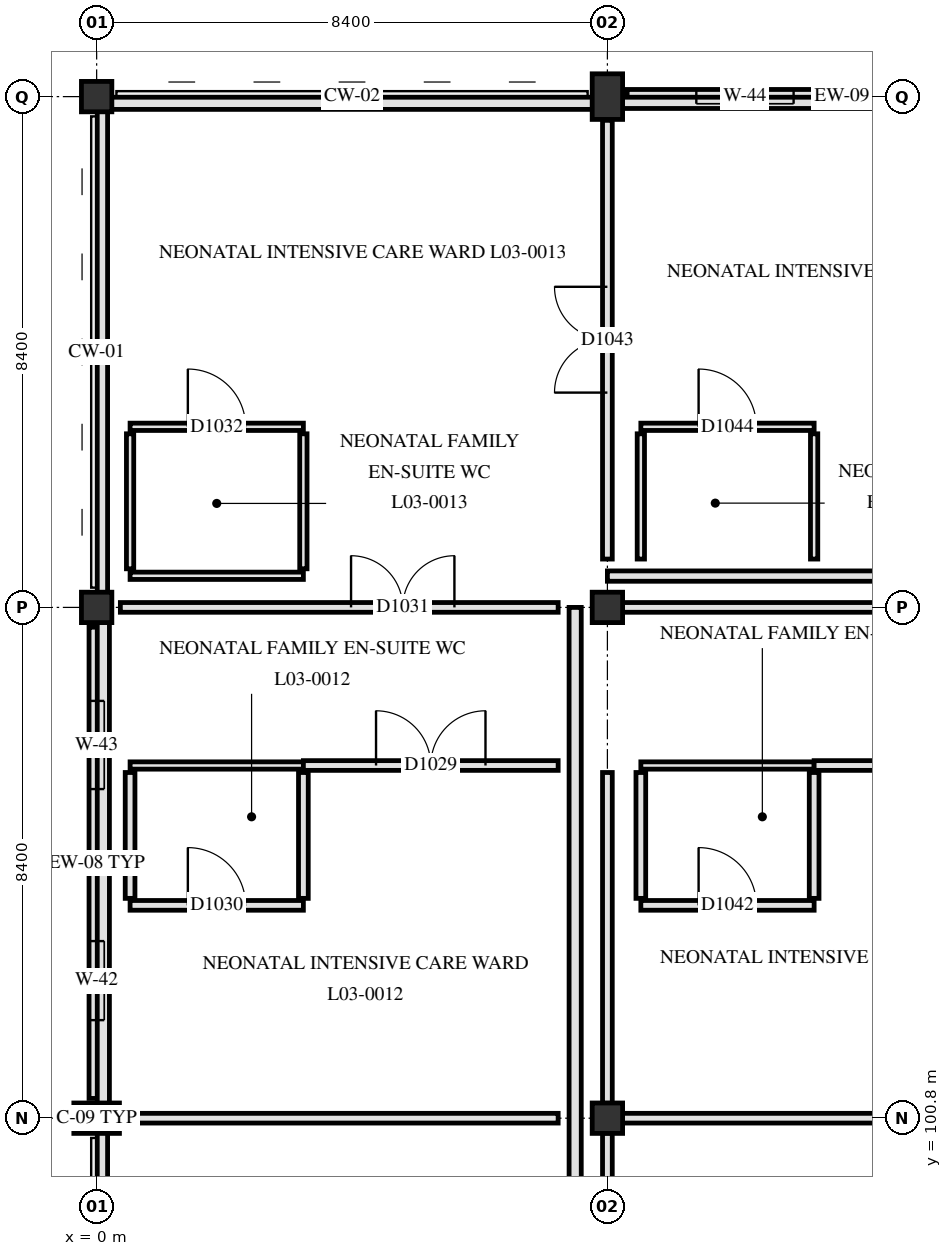
"""IFC4 building model, lengths in metres.
Left out: names, types, materials, properties, quantities, classifications, styles, units other than length and angle.
Written with IfcOpenShell. Run it as: python <this file> out.ifc"""

import sys

from ifc_helpers import new_model, si_unit, direction, frame, frame_2d, origin, origin_2d, place, context, subcontext, project, spatial, rectangle, extrude, element, fill, save


model = new_model("IFC4")
c1 = context("Model", 3, precision=1e-05, world=origin(), true_north=direction((0.0, 1.0)))
c2 = subcontext(c1, "Body", "Model", "MODEL_VIEW")
j1 = project(units=[si_unit("LENGTHUNIT", "METRE"), si_unit("PLANEANGLEUNIT", "RADIAN")], contexts=[c1])
p1 = place(None, origin())
s1 = spatial("IfcSite", under=j1, at=p1, CompositionType="ELEMENT")
p2 = place(p1, origin())
s2 = spatial("IfcBuilding", under=s1, at=p2, CompositionType="ELEMENT")
p3 = place(p2, frame((0.0, 0.0, 14.4)))
s3 = spatial("IfcBuildingStorey", under=s2, at=p3, CompositionType="ELEMENT", Elevation=14.4)
p4 = place(p3, frame((0.0, 100.8, 0.0), z_axis=(0.0, 0.0, 1.0), x_axis=(0.0, 1.0, 0.0)))
e1 = element("IfcColumn", 1, at=p4, inside=s3, PredefinedType="PILASTER", context=c2, shape_type="SweptSolid", body=[
    extrude(rectangle(XDim=0.5, YDim=0.75, at=origin_2d()), origin(), (0.0, 0.0, 1.0), 4.2),
])
for number, where, z_axis, x_axis in (
    (2, (0.0, 109.2, 0.0), (0.0, 0.0, 1.0), (1.0, 0.0, 0.0)),
    (3, (0.0, 117.6, 0.0), (0.0, 0.0, 1.0), (1.0, 0.0, 0.0)),
    (4, (8.4, 100.8, 0.0), (0.0, 0.0, 1.0), (1.0, 0.0, 0.0)),
    (5, (8.4, 109.2, 0.0), (0.0, 0.0, 1.0), (1.0, 0.0, 0.0)),
):
    element("IfcColumn", number, at=place(p3, frame(where, z_axis=z_axis, x_axis=x_axis)), inside=s3, PredefinedType="COLUMN", context=c2, shape_type="SweptSolid", body=[
        extrude(rectangle(XDim=0.5, YDim=0.5, at=origin_2d()), origin(), (0.0, 0.0, 1.0), 4.2),
    ])
p5 = place(p3, frame((8.4, 117.6, 0.0), z_axis=(0.0, 0.0, 1.0), x_axis=(1.0, 0.0, 0.0)))
e6 = element("IfcColumn", 6, at=p5, inside=s3, PredefinedType="PILASTER", context=c2, shape_type="SweptSolid", body=[
    extrude(rectangle(XDim=0.5, YDim=0.75, at=origin_2d()), origin(), (0.0, 0.0, 1.0), 4.2),
])
p6 = place(p3, frame((0.0, 101.125, 0.0), z_axis=(0.0, 0.0, 1.0), x_axis=(0.0, 1.0, 0.0)))
e7 = element("IfcWall", 7, at=p6, inside=s3, PredefinedType="SOLIDWALL", context=c2, shape_type="SweptSolid", body=[
    extrude(rectangle(XDim=7.75, YDim=0.25, at=frame_2d((3.875, 0.0))), origin(), (0.0, 0.0, 1.0), 3.19),
])
p7 = place(p6, frame((1.288, 0.0, 0.85)))
e8 = element("IfcOpeningElement", 8, at=p7, cuts=e7, PredefinedType="OPENING", context=c2, shape_type="SweptSolid", body=[
    extrude(rectangle(XDim=1.3, YDim=1.78, at=frame_2d((0.65, 0.89))), frame((0.0, 0.135, 0.0), z_axis=(0.0, -1.0, 0.0), x_axis=(1.0, 0.0, 0.0)), (0.0, 0.0, 1.0), 0.27),
])
p8 = place(p6, frame((5.087, 0.0, 0.85)))
e9 = element("IfcOpeningElement", 9, at=p8, cuts=e7, PredefinedType="OPENING", context=c2, shape_type="SweptSolid", body=[
    extrude(rectangle(XDim=1.45, YDim=1.78, at=frame_2d((0.725, 0.89))), frame((0.0, 0.135, 0.0), z_axis=(0.0, -1.0, 0.0), x_axis=(1.0, 0.0, 0.0)), (0.0, 0.0, 1.0), 0.27),
])
p9 = place(p3, frame((8.725, 117.6, 0.0), z_axis=(0.0, 0.0, 1.0), x_axis=(1.0, 0.0, 0.0)))
e10 = element("IfcWall", 10, at=p9, inside=s3, PredefinedType="SOLIDWALL", context=c2, shape_type="SweptSolid", body=[
    extrude(rectangle(XDim=7.75, YDim=0.235, at=frame_2d((3.875, 0.0))), origin(), (0.0, 0.0, 1.0), 3.19),
])
p10 = place(p9, frame((1.137, 0.0, 0.85)))
e11 = element("IfcOpeningElement", 11, at=p10, cuts=e10, PredefinedType="OPENING", context=c2, shape_type="SweptSolid", body=[
    extrude(rectangle(XDim=1.6, YDim=1.78, at=frame_2d((0.8, 0.89))), frame((0.0, 0.127, 0.0), z_axis=(0.0, -1.0, 0.0), x_axis=(1.0, 0.0, 0.0)), (0.0, 0.0, 1.0), 0.255),
])
p11 = place(p9, frame((4.938, 0.0, 0.85)))
e12 = element("IfcOpeningElement", 12, at=p11, cuts=e10, PredefinedType="OPENING", context=c2, shape_type="SweptSolid", body=[
    extrude(rectangle(XDim=1.75, YDim=1.78, at=frame_2d((0.875, 0.89))), frame((0.0, 0.127, 0.0), z_axis=(0.0, -1.0, 0.0), x_axis=(1.0, 0.0, 0.0)), (0.0, 0.0, 1.0), 0.255),
])
p12 = place(p3, frame((0.095, 109.2, 4.18), z_axis=(0.0, 0.0, 1.0), x_axis=(0.0, 1.0, 0.0)))
e13 = element("IfcWall", 13, at=p12, inside=s3, PredefinedType="PARAPET", context=c2, shape_type="SweptSolid", body=[
    extrude(rectangle(XDim=8.4, YDim=0.17, at=frame_2d((4.2, 0.0))), origin(), (0.0, 0.0, 1.0), 1.17),
])
p13 = place(p3, frame((0.0, 117.49, 4.18), z_axis=(0.0, 0.0, 1.0), x_axis=(1.0, 0.0, 0.0)))
e14 = element("IfcWall", 14, at=p13, inside=s3, PredefinedType="PARAPET", context=c2, shape_type="SweptSolid", body=[
    extrude(rectangle(XDim=8.4, YDim=0.2, at=frame_2d((4.2, 0.0))), origin(), (0.0, 0.0, 1.0), 1.17),
])
p14 = place(p3, frame((8.4, 117.498, 4.18), z_axis=(0.0, 0.0, 1.0), x_axis=(1.0, 0.0, 0.0)))
e15 = element("IfcWall", 15, at=p14, inside=s3, PredefinedType="PARAPET", context=c2, shape_type="SweptSolid", body=[
    extrude(rectangle(XDim=8.4, YDim=0.185, at=frame_2d((4.2, 0.0))), origin(), (0.0, 0.0, 1.0), 1.17),
])
p15 = place(p3, frame((41.62, 109.715, 4.18), z_axis=(0.0, 0.0, 1.0), x_axis=(-1.0, 0.0, 0.0)))
e16 = element("IfcWall", 16, at=p15, inside=s3, PredefinedType="PARAPET", context=c2, shape_type="SweptSolid", body=[
    extrude(rectangle(XDim=33.22, YDim=0.17, at=frame_2d((16.61, 0.0))), origin(), (0.0, 0.0, 1.0), 1.17),
])
p16 = place(p3, frame((7.87, 109.2, 4.18), z_axis=(0.0, 0.0, 1.0), x_axis=(0.0, -1.0, 0.0)))
e17 = element("IfcWall", 17, at=p16, inside=s3, PredefinedType="PARAPET", context=c2, shape_type="SweptSolid", body=[
    extrude(rectangle(XDim=50.4, YDim=0.2, at=frame_2d((25.2, 0.0))), origin(), (0.0, 0.0, 1.0), 1.17),
])
p17 = place(p3, frame((0.095, 92.4, 4.18), z_axis=(0.0, 0.0, 1.0), x_axis=(0.0, 1.0, 0.0)))
e18 = element("IfcWall", 18, at=p17, inside=s3, PredefinedType="PARAPET", context=c2, shape_type="SweptSolid", body=[
    extrude(rectangle(XDim=8.4, YDim=0.17, at=frame_2d((4.2, 0.0))), origin(), (0.0, 0.0, 1.0), 1.17),
])
p18 = place(p3, frame((0.11, 100.8, 4.18), z_axis=(0.0, 0.0, 1.0), x_axis=(0.0, 1.0, 0.0)))
e19 = element("IfcWall", 19, at=p18, inside=s3, PredefinedType="PARAPET", context=c2, shape_type="SweptSolid", body=[
    extrude(rectangle(XDim=8.4, YDim=0.2, at=frame_2d((4.2, 0.0))), origin(), (0.0, 0.0, 1.0), 1.17),
])
p19 = place(p3, frame((0.39, 100.8, 0.0), z_axis=(0.0, 0.0, 1.0), x_axis=(1.0, 0.0, 0.0)))
e20 = element("IfcWall", 20, at=p19, inside=s3, PredefinedType="PARTITIONING", context=c2, shape_type="SweptSolid", body=[
    extrude(rectangle(XDim=7.2, YDim=0.16, at=frame_2d((3.6, 0.0))), origin(), (0.0, 0.0, 1.0), 3.29),
])
p20 = place(p3, frame((8.645, 100.8, 0.0), z_axis=(0.0, 0.0, 1.0), x_axis=(1.0, 0.0, 0.0)))
e21 = element("IfcWall", 21, at=p20, inside=s3, PredefinedType="PARTITIONING", context=c2, shape_type="SweptSolid", body=[
    extrude(rectangle(XDim=7.91, YDim=0.16, at=frame_2d((3.955, 0.0))), origin(), (0.0, 0.0, 1.0), 3.28),
])
p21 = place(p3, frame((0.55, 104.3, 0.0), z_axis=(0.0, 0.0, 1.0), x_axis=(1.0, 0.0, 0.0)))
e22 = element("IfcWall", 22, at=p21, inside=s3, PredefinedType="PARTITIONING", context=c2, shape_type="SweptSolid", body=[
    extrude(rectangle(XDim=2.85, YDim=0.16, at=frame_2d((1.425, 0.0))), origin(), (0.0, 0.0, 1.0), 3.89),
])
p22 = place(p21, frame((0.95, 0.0, 0.0)))
e23 = element("IfcOpeningElement", 23, at=p22, cuts=e22, PredefinedType="OPENING", context=c2, shape_type="SweptSolid", body=[
    extrude(rectangle(XDim=0.95, YDim=2.1, at=frame_2d((0.475, 1.05))), frame((0.0, 0.09, 0.0), z_axis=(0.0, -1.0, 0.0), x_axis=(1.0, 0.0, 0.0)), (0.0, 0.0, 1.0), 0.18),
])
p23 = place(p3, frame((8.95, 104.3, 0.0), z_axis=(0.0, 0.0, 1.0), x_axis=(1.0, 0.0, 0.0)))
e24 = element("IfcWall", 24, at=p23, inside=s3, PredefinedType="PARTITIONING", context=c2, shape_type="SweptSolid", body=[
    extrude(rectangle(XDim=2.85, YDim=0.16, at=frame_2d((1.425, 0.0))), origin(), (0.0, 0.0, 1.0), 3.89),
])
p24 = place(p23, frame((0.95, 0.0, 0.0)))
e25 = element("IfcOpeningElement", 25, at=p24, cuts=e24, PredefinedType="OPENING", context=c2, shape_type="SweptSolid", body=[
    extrude(rectangle(XDim=0.95, YDim=2.1, at=frame_2d((0.475, 1.05))), frame((0.0, 0.09, 0.0), z_axis=(0.0, -1.0, 0.0), x_axis=(1.0, 0.0, 0.0)), (0.0, 0.0, 1.0), 0.18),
])
p25 = place(p3, frame((0.55, 106.6, 0.0), z_axis=(0.0, 0.0, 1.0), x_axis=(1.0, 0.0, 0.0)))
e26 = element("IfcWall", 26, at=p25, inside=s3, PredefinedType="PARTITIONING", context=c2, shape_type="SweptSolid", body=[
    extrude(rectangle(XDim=2.85, YDim=0.12, at=frame_2d((1.425, 0.0))), origin(), (0.0, 0.0, 1.0), 3.89),
])
p26 = place(p3, frame((3.4, 106.6, 0.0), z_axis=(0.0, 0.0, 1.0), x_axis=(1.0, 0.0, 0.0)))
e27 = element("IfcWall", 27, at=p26, inside=s3, PredefinedType="PARTITIONING", context=c2, shape_type="SweptSolid", body=[
    extrude(rectangle(XDim=4.19, YDim=0.16, at=frame_2d((2.095, 0.0))), origin(), (0.0, 0.0, 1.0), 3.89),
])
p27 = place(p26, frame((1.195, 0.0, 0.0)))
e28 = element("IfcOpeningElement", 28, at=p27, cuts=e27, PredefinedType="OPENING", context=c2, shape_type="SweptSolid", body=[
    extrude(rectangle(XDim=1.8, YDim=2.25, at=frame_2d((0.9, 1.125))), frame((0.0, 0.09, 0.0), z_axis=(0.0, -1.0, 0.0), x_axis=(1.0, 0.0, 0.0)), (0.0, 0.0, 1.0), 0.18),
])
p28 = place(p3, frame((8.95, 106.6, 0.0), z_axis=(0.0, 0.0, 1.0), x_axis=(1.0, 0.0, 0.0)))
e29 = element("IfcWall", 29, at=p28, inside=s3, PredefinedType="PARTITIONING", context=c2, shape_type="SweptSolid", body=[
    extrude(rectangle(XDim=2.85, YDim=0.12, at=frame_2d((1.425, 0.0))), origin(), (0.0, 0.0, 1.0), 3.89),
])
p29 = place(p3, frame((11.8, 106.6, 0.0), z_axis=(0.0, 0.0, 1.0), x_axis=(1.0, 0.0, 0.0)))
e30 = element("IfcWall", 30, at=p29, inside=s3, PredefinedType="PARTITIONING", context=c2, shape_type="SweptSolid", body=[
    extrude(rectangle(XDim=5.0, YDim=0.16, at=frame_2d((2.5, 0.0))), origin(), (0.0, 0.0, 1.0), 3.33),
])
p30 = place(p29, frame((1.73, 0.0, 0.0)))
e31 = element("IfcOpeningElement", 31, at=p30, cuts=e30, PredefinedType="OPENING", context=c2, shape_type="SweptSolid", body=[
    extrude(rectangle(XDim=1.54, YDim=2.24, at=frame_2d((0.77, 1.12))), frame((0.0, 0.09, 0.0), z_axis=(0.0, -1.0, 0.0), x_axis=(1.0, 0.0, 0.0)), (0.0, 0.0, 1.0), 0.18),
])
p31 = place(p3, frame((0.39, 109.2, 0.0), z_axis=(0.0, 0.0, 1.0), x_axis=(1.0, 0.0, 0.0)))
e32 = element("IfcWall", 32, at=p31, inside=s3, PredefinedType="PARTITIONING", context=c2, shape_type="SweptSolid", body=[
    extrude(rectangle(XDim=7.2, YDim=0.16, at=frame_2d((3.6, 0.0))), origin(), (0.0, 0.0, 1.0), 3.29),
])
p32 = place(p31, frame((3.794, 0.0, 0.0)))
e33 = element("IfcOpeningElement", 33, at=p32, cuts=e32, PredefinedType="OPENING", context=c2, shape_type="SweptSolid", body=[
    extrude(rectangle(XDim=1.7, YDim=2.25, at=frame_2d((0.85, 1.125))), frame((0.0, 0.09, 0.0), z_axis=(0.0, -1.0, 0.0), x_axis=(1.0, 0.0, 0.0)), (0.0, 0.0, 1.0), 0.18),
])
p33 = place(p3, frame((8.645, 109.2, 0.0), z_axis=(0.0, 0.0, 1.0), x_axis=(1.0, 0.0, 0.0)))
e34 = element("IfcWall", 34, at=p33, inside=s3, PredefinedType="PARTITIONING", context=c2, shape_type="SweptSolid", body=[
    extrude(rectangle(XDim=7.91, YDim=0.16, at=frame_2d((3.955, 0.0))), origin(), (0.0, 0.0, 1.0), 3.28),
])
p34 = place(p3, frame((0.55, 109.72, 0.0), z_axis=(0.0, 0.0, 1.0), x_axis=(1.0, 0.0, 0.0)))
e35 = element("IfcWall", 35, at=p34, inside=s3, PredefinedType="PARTITIONING", context=c2, shape_type="SweptSolid", body=[
    extrude(rectangle(XDim=2.85, YDim=0.12, at=frame_2d((1.425, 0.0))), origin(), (0.0, 0.0, 1.0), 3.89),
])
p35 = place(p3, frame((0.55, 112.17, 0.0), z_axis=(0.0, 0.0, 1.0), x_axis=(1.0, 0.0, 0.0)))
e36 = element("IfcWall", 36, at=p35, inside=s3, PredefinedType="PARTITIONING", context=c2, shape_type="SweptSolid", body=[
    extrude(rectangle(XDim=2.85, YDim=0.12, at=frame_2d((1.425, 0.0))), origin(), (0.0, 0.0, 1.0), 3.89),
])
p36 = place(p35, frame((0.95, 0.0, 0.0)))
e37 = element("IfcOpeningElement", 37, at=p36, cuts=e36, PredefinedType="OPENING", context=c2, shape_type="SweptSolid", body=[
    extrude(rectangle(XDim=0.95, YDim=2.1, at=frame_2d((0.475, 1.05))), frame((0.0, 0.07, 0.0), z_axis=(0.0, -1.0, 0.0), x_axis=(1.0, 0.0, 0.0)), (0.0, 0.0, 1.0), 0.14),
])
p37 = place(p3, frame((8.95, 112.17, 0.0), z_axis=(0.0, 0.0, 1.0), x_axis=(1.0, 0.0, 0.0)))
e38 = element("IfcWall", 38, at=p37, inside=s3, PredefinedType="PARTITIONING", context=c2, shape_type="SweptSolid", body=[
    extrude(rectangle(XDim=2.85, YDim=0.12, at=frame_2d((1.425, 0.0))), origin(), (0.0, 0.0, 1.0), 3.89),
])
p38 = place(p37, frame((0.95, 0.0, 0.0)))
e39 = element("IfcOpeningElement", 39, at=p38, cuts=e38, PredefinedType="OPENING", context=c2, shape_type="SweptSolid", body=[
    extrude(rectangle(XDim=0.95, YDim=2.1, at=frame_2d((0.475, 1.05))), frame((0.0, 0.07, 0.0), z_axis=(0.0, -1.0, 0.0), x_axis=(1.0, 0.0, 0.0)), (0.0, 0.0, 1.0), 0.14),
])
p39 = place(p3, frame((0.55, 104.415, 0.0), z_axis=(0.0, 0.0, 1.0), x_axis=(0.0, 1.0, 0.0)))
e40 = element("IfcWall", 40, at=p39, inside=s3, PredefinedType="PARTITIONING", context=c2, shape_type="SweptSolid", body=[
    extrude(rectangle(XDim=2.07, YDim=0.16, at=frame_2d((1.035, 0.0))), origin(), (0.0, 0.0, 1.0), 3.89),
])
p40 = place(p3, frame((0.55, 109.835, 0.0), z_axis=(0.0, 0.0, 1.0), x_axis=(0.0, 1.0, 0.0)))
e41 = element("IfcWall", 41, at=p40, inside=s3, PredefinedType="PARTITIONING", context=c2, shape_type="SweptSolid", body=[
    extrude(rectangle(XDim=2.22, YDim=0.12, at=frame_2d((1.11, 0.0))), origin(), (0.0, 0.0, 1.0), 3.89),
])
p41 = place(p3, frame((3.4, 104.415, 0.0), z_axis=(0.0, 0.0, 1.0), x_axis=(0.0, 1.0, 0.0)))
e42 = element("IfcWall", 42, at=p41, inside=s3, PredefinedType="PARTITIONING", context=c2, shape_type="SweptSolid", body=[
    extrude(rectangle(XDim=2.07, YDim=0.16, at=frame_2d((1.035, 0.0))), origin(), (0.0, 0.0, 1.0), 3.89),
])
p42 = place(p3, frame((3.4, 109.835, 0.0), z_axis=(0.0, 0.0, 1.0), x_axis=(0.0, 1.0, 0.0)))
e43 = element("IfcWall", 43, at=p42, inside=s3, PredefinedType="PARTITIONING", context=c2, shape_type="SweptSolid", body=[
    extrude(rectangle(XDim=2.22, YDim=0.12, at=frame_2d((1.11, 0.0))), origin(), (0.0, 0.0, 1.0), 3.89),
])
p43 = place(p3, frame((8.4, 95.115, 0.0), z_axis=(0.0, 0.0, 1.0), x_axis=(0.0, 1.0, 0.0)))
e44 = element("IfcWall", 44, at=p43, inside=s3, PredefinedType="PARTITIONING", context=c2, shape_type="SweptSolid", body=[
    extrude(rectangle(XDim=5.44, YDim=0.16, at=frame_2d((2.72, 0.0))), origin(), (0.0, 0.0, 1.0), 3.33),
])
p44 = place(p3, frame((8.4, 101.045, 0.0), z_axis=(0.0, 0.0, 1.0), x_axis=(0.0, 1.0, 0.0)))
e45 = element("IfcWall", 45, at=p44, inside=s3, PredefinedType="PARTITIONING", context=c2, shape_type="SweptSolid", body=[
    extrude(rectangle(XDim=5.44, YDim=0.16, at=frame_2d((2.72, 0.0))), origin(), (0.0, 0.0, 1.0), 3.33),
])
p45 = place(p3, frame((8.4, 109.995, 0.0), z_axis=(0.0, 0.0, 1.0), x_axis=(0.0, 1.0, 0.0)))
e46 = element("IfcWall", 46, at=p45, inside=s3, PredefinedType="PARTITIONING", context=c2, shape_type="SweptSolid", body=[
    extrude(rectangle(XDim=7.215, YDim=0.16, at=frame_2d((3.607, 0.0))), origin(), (0.0, 0.0, 1.0), 3.34),
])
p46 = place(p45, frame((2.738, 0.0, 0.0)))
e47 = element("IfcOpeningElement", 47, at=p46, cuts=e46, PredefinedType="OPENING", context=c2, shape_type="SweptSolid", body=[
    extrude(rectangle(XDim=1.74, YDim=2.24, at=frame_2d((0.87, 1.12))), frame((0.0, 0.09, 0.0), z_axis=(0.0, -1.0, 0.0), x_axis=(1.0, 0.0, 0.0)), (0.0, 0.0, 1.0), 0.18),
])
p47 = place(p3, frame((8.95, 104.415, 0.0), z_axis=(0.0, 0.0, 1.0), x_axis=(0.0, 1.0, 0.0)))
e48 = element("IfcWall", 48, at=p47, inside=s3, PredefinedType="PARTITIONING", context=c2, shape_type="SweptSolid", body=[
    extrude(rectangle(XDim=2.07, YDim=0.16, at=frame_2d((1.035, 0.0))), origin(), (0.0, 0.0, 1.0), 3.89),
])
p48 = place(p3, frame((8.95, 109.995, 0.0), z_axis=(0.0, 0.0, 1.0), x_axis=(0.0, 1.0, 0.0)))
e49 = element("IfcWall", 49, at=p48, inside=s3, PredefinedType="PARTITIONING", context=c2, shape_type="SweptSolid", body=[
    extrude(rectangle(XDim=2.06, YDim=0.12, at=frame_2d((1.03, 0.0))), origin(), (0.0, 0.0, 1.0), 3.89),
])
p49 = place(p3, frame((11.8, 104.415, 0.0), z_axis=(0.0, 0.0, 1.0), x_axis=(0.0, 1.0, 0.0)))
e50 = element("IfcWall", 50, at=p49, inside=s3, PredefinedType="PARTITIONING", context=c2, shape_type="SweptSolid", body=[
    extrude(rectangle(XDim=2.07, YDim=0.16, at=frame_2d((1.035, 0.0))), origin(), (0.0, 0.0, 1.0), 3.89),
])
p50 = place(p3, frame((11.8, 109.995, 0.0), z_axis=(0.0, 0.0, 1.0), x_axis=(0.0, 1.0, 0.0)))
e51 = element("IfcWall", 51, at=p50, inside=s3, PredefinedType="PARTITIONING", context=c2, shape_type="SweptSolid", body=[
    extrude(rectangle(XDim=2.06, YDim=0.12, at=frame_2d((1.03, 0.0))), origin(), (0.0, 0.0, 1.0), 3.89),
])
p51 = place(p7, origin())
e52 = element("IfcWindow", 52, at=p51, inside=s3, PartitioningType="SINGLE_PANEL", PredefinedType="WINDOW", context=c2, shape_type="SweptSolid", body=[
    extrude(rectangle(XDim=1.3, YDim=1.78, at=frame_2d((0.65, 0.89))), frame((0.0, 0.03, 0.0), z_axis=(0.0, -1.0, 0.0), x_axis=(1.0, 0.0, 0.0)), (0.0, 0.0, 1.0), 0.06),
])
fill(e8, e52)
p52 = place(p8, origin())
e53 = element("IfcWindow", 53, at=p52, inside=s3, PartitioningType="SINGLE_PANEL", PredefinedType="WINDOW", context=c2, shape_type="SweptSolid", body=[
    extrude(rectangle(XDim=1.45, YDim=1.78, at=frame_2d((0.725, 0.89))), frame((0.0, 0.03, 0.0), z_axis=(0.0, -1.0, 0.0), x_axis=(1.0, 0.0, 0.0)), (0.0, 0.0, 1.0), 0.06),
])
fill(e9, e53)
p53 = place(p10, origin())
e54 = element("IfcWindow", 54, at=p53, inside=s3, PartitioningType="SINGLE_PANEL", PredefinedType="WINDOW", context=c2, shape_type="SweptSolid", body=[
    extrude(rectangle(XDim=1.6, YDim=1.78, at=frame_2d((0.8, 0.89))), frame((0.0, 0.03, 0.0), z_axis=(0.0, -1.0, 0.0), x_axis=(1.0, 0.0, 0.0)), (0.0, 0.0, 1.0), 0.06),
])
fill(e11, e54)
p54 = place(p27, origin())
e55 = element("IfcDoor", 55, at=p54, inside=s3, OperationType="DOUBLE_SWING_RIGHT", PredefinedType="DOOR", context=c2, shape_type="SweptSolid", body=[
    extrude(rectangle(XDim=1.8, YDim=2.25, at=frame_2d((0.9, 1.125))), frame((0.0, 0.025, 0.0), z_axis=(0.0, -1.0, 0.0), x_axis=(1.0, 0.0, 0.0)), (0.0, 0.0, 1.0), 0.05),
])
fill(e28, e55)
p55 = place(p22, origin())
e56 = element("IfcDoor", 56, at=p55, inside=s3, OperationType="SINGLE_SWING_LEFT", PredefinedType="DOOR", context=c2, shape_type="SweptSolid", body=[
    extrude(rectangle(XDim=0.95, YDim=2.1, at=frame_2d((0.475, 1.05))), frame((0.0, 0.025, 0.0), z_axis=(0.0, -1.0, 0.0), x_axis=(1.0, 0.0, 0.0)), (0.0, 0.0, 1.0), 0.05),
])
fill(e23, e56)
p56 = place(p32, origin())
e57 = element("IfcDoor", 57, at=p56, inside=s3, OperationType="DOUBLE_SWING_RIGHT", PredefinedType="DOOR", context=c2, shape_type="SweptSolid", body=[
    extrude(rectangle(XDim=1.7, YDim=2.25, at=frame_2d((0.85, 1.125))), frame((0.0, 0.025, 0.0), z_axis=(0.0, -1.0, 0.0), x_axis=(1.0, 0.0, 0.0)), (0.0, 0.0, 1.0), 0.05),
])
fill(e33, e57)
p57 = place(p36, origin())
e58 = element("IfcDoor", 58, at=p57, inside=s3, OperationType="SINGLE_SWING_LEFT", PredefinedType="DOOR", context=c2, shape_type="SweptSolid", body=[
    extrude(rectangle(XDim=0.95, YDim=2.1, at=frame_2d((0.475, 1.05))), frame((0.0, 0.025, 0.0), z_axis=(0.0, -1.0, 0.0), x_axis=(1.0, 0.0, 0.0)), (0.0, 0.0, 1.0), 0.05),
])
fill(e37, e58)
p58 = place(p24, origin())
e59 = element("IfcDoor", 59, at=p58, inside=s3, OperationType="SINGLE_SWING_LEFT", PredefinedType="DOOR", context=c2, shape_type="SweptSolid", body=[
    extrude(rectangle(XDim=0.95, YDim=2.1, at=frame_2d((0.475, 1.05))), frame((0.0, 0.025, 0.0), z_axis=(0.0, -1.0, 0.0), x_axis=(1.0, 0.0, 0.0)), (0.0, 0.0, 1.0), 0.05),
])
fill(e25, e59)
p59 = place(p46, origin())
e60 = element("IfcDoor", 60, at=p59, inside=s3, OperationType="DOUBLE_SWING_RIGHT", PredefinedType="DOOR", context=c2, shape_type="SweptSolid", body=[
    extrude(rectangle(XDim=1.74, YDim=2.24, at=frame_2d((0.87, 1.12))), frame((0.0, 0.025, 0.0), z_axis=(0.0, -1.0, 0.0), x_axis=(1.0, 0.0, 0.0)), (0.0, 0.0, 1.0), 0.05),
])
fill(e47, e60)
p60 = place(p38, origin())
e61 = element("IfcDoor", 61, at=p60, inside=s3, OperationType="SINGLE_SWING_LEFT", PredefinedType="DOOR", context=c2, shape_type="SweptSolid", body=[
    extrude(rectangle(XDim=0.95, YDim=2.1, at=frame_2d((0.475, 1.05))), frame((0.0, 0.025, 0.0), z_axis=(0.0, -1.0, 0.0), x_axis=(1.0, 0.0, 0.0)), (0.0, 0.0, 1.0), 0.05),
])
fill(e39, e61)
save(model, sys.argv[1])
